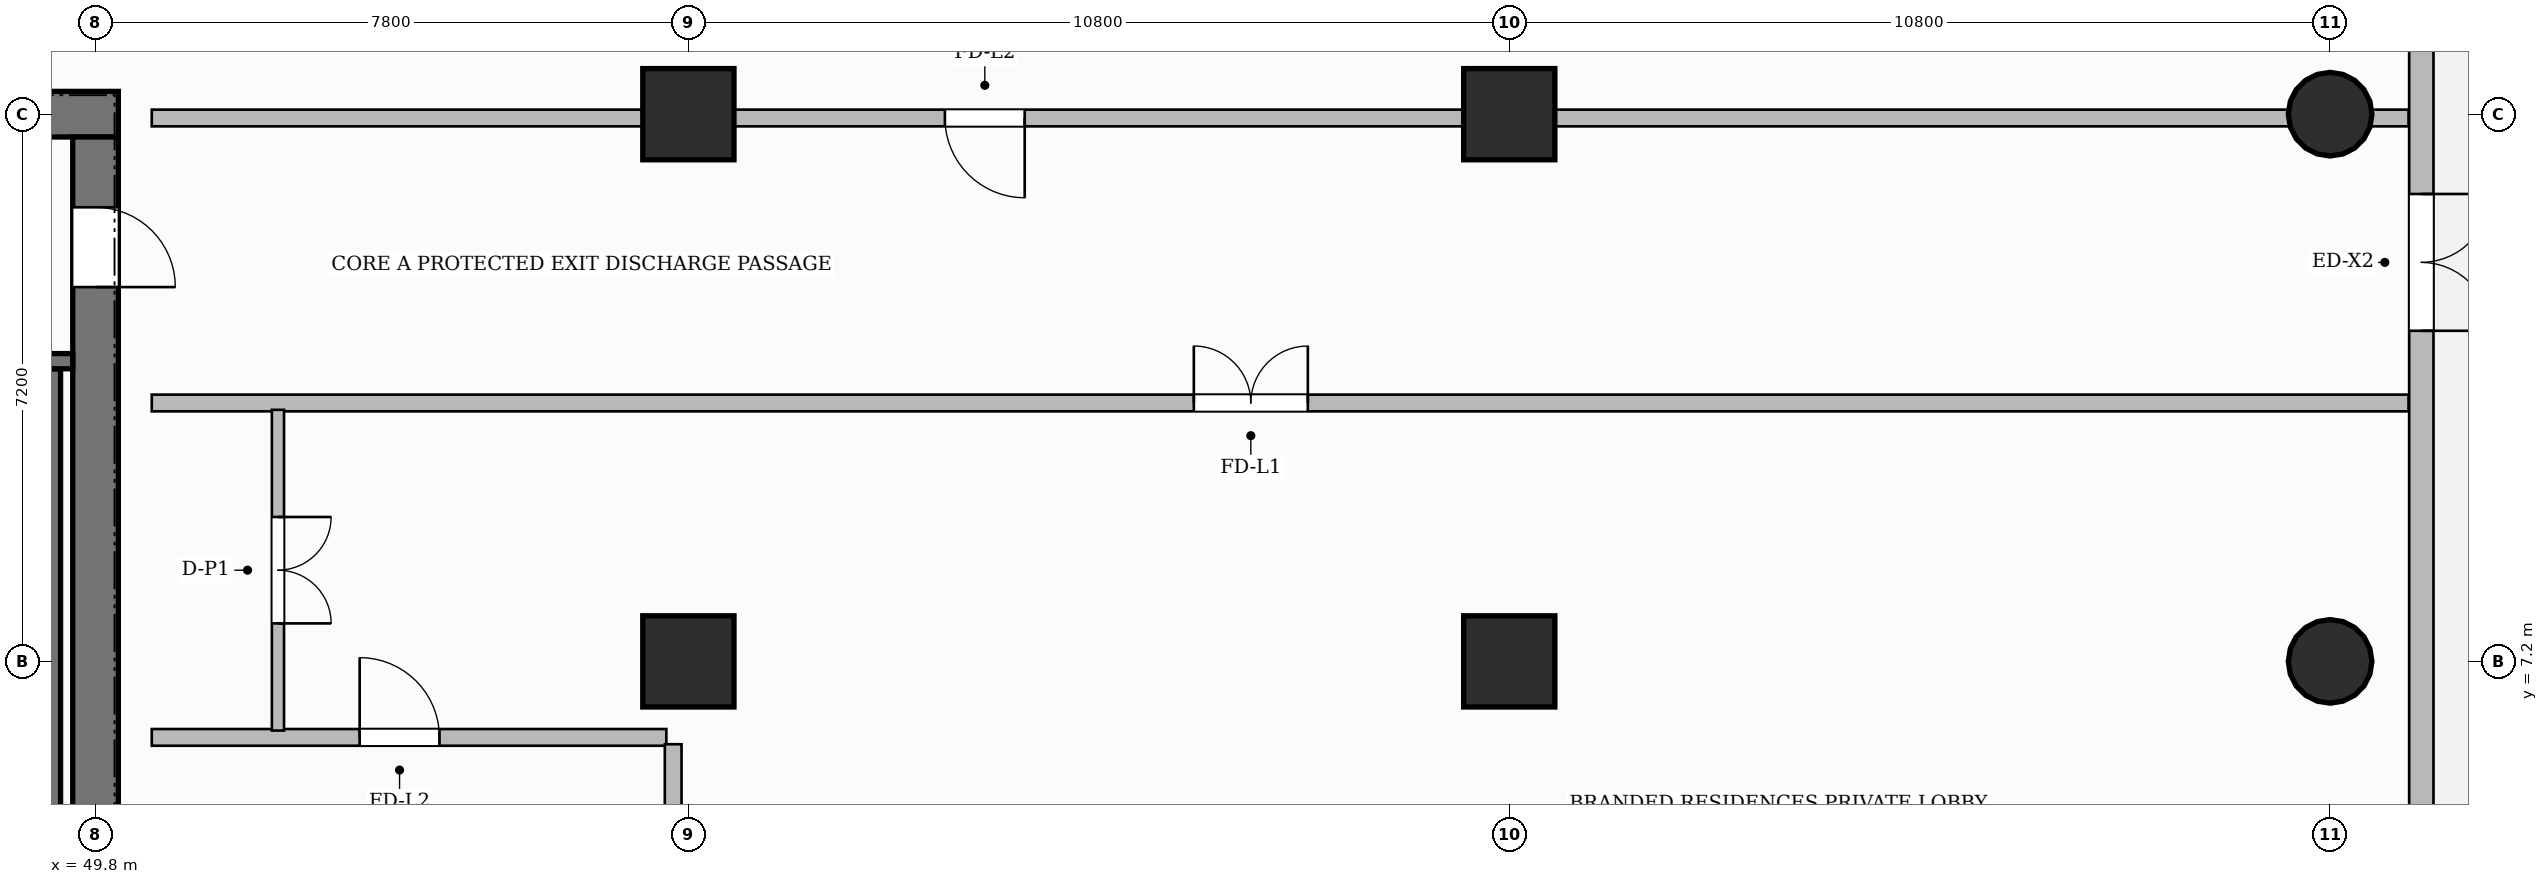
"""IFC4 building model, lengths in metres.
Left out: names, types, materials, properties, quantities, classifications, styles, units other than length and angle.
Written with IfcOpenShell. Run it as: python <this file> out.ifc"""

import sys

from ifc_helpers import new_model, si_unit, direction, frame, frame_2d, origin, origin_2d, place, context, subcontext, project, spatial, rectangle, circle, extrude, source, transform, mapped, element, fill, save


model = new_model("IFC4")
c1 = context("Model", 3, precision=1e-05, world=origin(), true_north=direction((0.0, 1.0)))
c2 = subcontext(c1, "Body", "Model", "MODEL_VIEW")
j1 = project(units=[si_unit("LENGTHUNIT", "METRE"), si_unit("PLANEANGLEUNIT", "RADIAN")], contexts=[c1])
p1 = place(None, origin())
s1 = spatial("IfcSite", under=j1, at=p1, CompositionType="ELEMENT")
p2 = place(p1, origin())
s2 = spatial("IfcBuilding", under=s1, at=p2, CompositionType="ELEMENT")
p3 = place(p2, origin())
s3 = spatial("IfcBuildingStorey", under=s2, at=p3, CompositionType="ELEMENT", Elevation=0.0)
p4 = place(p3, frame((34.5, 14.4, 0.0), z_axis=(0.0, 0.0, 1.0), x_axis=(1.0, 0.0, 0.0)))
e1 = element("IfcWall", 1, at=p4, inside=s3, PredefinedType="SHEAR", context=c2, shape_type="SweptSolid", body=[
    extrude(rectangle(XDim=15.6, YDim=0.6, at=frame_2d((7.8, 0.0))), origin(), (0.0, 0.0, 1.0), 5.4),
])
p5 = place(p4, frame((5.43, 0.0, 0.0)))
e2 = element("IfcOpeningElement", 2, at=p5, cuts=e1, PredefinedType="OPENING", context=c2, shape_type="SweptSolid", body=[
    extrude(rectangle(XDim=1.5, YDim=2.2, at=frame_2d((0.75, 1.1))), frame((0.0, 0.31, 0.0), z_axis=(0.0, -1.0, 0.0), x_axis=(1.0, 0.0, 0.0)), (0.0, 0.0, 1.0), 0.62),
])
p6 = place(p4, frame((1.645, 0.0, 0.0)))
e3 = element("IfcOpeningElement", 3, at=p6, cuts=e1, PredefinedType="OPENING", context=c2, shape_type="SweptSolid", body=[
    extrude(rectangle(XDim=1.05, YDim=2.15, at=frame_2d((0.525, 1.075))), frame((0.0, 0.31, 0.0), z_axis=(0.0, -1.0, 0.0), x_axis=(1.0, 0.0, 0.0)), (0.0, 0.0, 1.0), 0.62),
])
p7 = place(p4, frame((11.275, 0.0, 0.0)))
e4 = element("IfcOpeningElement", 4, at=p7, cuts=e1, PredefinedType="OPENING", context=c2, shape_type="SweptSolid", body=[
    extrude(rectangle(XDim=1.05, YDim=2.15, at=frame_2d((0.525, 1.075))), frame((0.0, 0.31, 0.0), z_axis=(0.0, -1.0, 0.0), x_axis=(1.0, 0.0, 0.0)), (0.0, 0.0, 1.0), 0.62),
])
p8 = place(p3, frame((49.8, 3.9, 0.0), z_axis=(0.0, 0.0, 1.0), x_axis=(0.0, 1.0, 0.0)))
e5 = element("IfcWall", 5, at=p8, inside=s3, PredefinedType="SHEAR", context=c2, shape_type="SweptSolid", body=[
    extrude(rectangle(XDim=10.2, YDim=0.6, at=frame_2d((5.1, 0.0))), origin(), (0.0, 0.0, 1.0), 5.4),
])
p9 = place(p8, frame((8.225, 0.0, 0.0)))
e6 = element("IfcOpeningElement", 6, at=p9, cuts=e5, PredefinedType="OPENING", context=c2, shape_type="SweptSolid", body=[
    extrude(rectangle(XDim=1.05, YDim=2.2, at=frame_2d((0.525, 1.1))), frame((0.0, 0.31, 0.0), z_axis=(0.0, -1.0, 0.0), x_axis=(1.0, 0.0, 0.0)), (0.0, 0.0, 1.0), 0.62),
])
m1 = source(origin(), c2, "Body", "SweptSolid", [
    extrude(rectangle(XDim=1.2, YDim=1.2, at=origin_2d()), origin(), (0.0, 0.0, 1.0), 5.4),
])
for number, where, z_axis, x_axis in (
    (7, (57.6, 7.2, 0.0), (0.0, 0.0, 1.0), (1.0, 0.0, 0.0)),
    (8, (57.6, 14.4, 0.0), (0.0, 0.0, 1.0), (1.0, 0.0, 0.0)),
    (9, (68.4, 7.2, 0.0), (0.0, 0.0, 1.0), (1.0, 0.0, 0.0)),
    (10, (68.4, 14.4, 0.0), (0.0, 0.0, 1.0), (1.0, 0.0, 0.0)),
):
    element("IfcColumn", number, at=place(p3, frame(where, z_axis=z_axis, x_axis=x_axis)), inside=s3, PredefinedType="COLUMN", context=c2, shape_type="MappedRepresentation", body=[
        mapped(m1, transform((0.0, 0.0, 0.0), scale=1.0)),
    ])
m2 = source(origin(), c2, "Body", "SweptSolid", [
    extrude(circle(Radius=0.55, at=origin_2d()), origin(), (0.0, 0.0, 1.0), 5.4),
])
for number, where, z_axis, x_axis in (
    (11, (79.2, 7.2, 0.0), (0.0, 0.0, 1.0), (1.0, 0.0, 0.0)),
    (12, (79.2, 14.4, 0.0), (0.0, 0.0, 1.0), (1.0, 0.0, 0.0)),
):
    element("IfcColumn", number, at=place(p3, frame(where, z_axis=z_axis, x_axis=x_axis)), inside=s3, PredefinedType="COLUMN", context=c2, shape_type="MappedRepresentation", body=[
        mapped(m2, transform((0.0, 0.0, 0.0), scale=1.0)),
    ])
p10 = place(p3, frame((49.24, 4.1, 0.0), z_axis=(0.0, 0.0, 1.0), x_axis=(0.0, 1.0, 0.0)))
e13 = element("IfcWall", 13, at=p10, inside=s3, PredefinedType="SHEAR", context=c2, shape_type="SweptSolid", body=[
    extrude(rectangle(XDim=6.95, YDim=0.2, at=frame_2d((3.475, 0.0))), origin(), (0.0, 0.0, 1.0), 5.4),
])
p11 = place(p3, frame((43.12, 11.15, 0.0), z_axis=(0.0, 0.0, 1.0), x_axis=(1.0, 0.0, 0.0)))
e14 = element("IfcWall", 14, at=p11, inside=s3, PredefinedType="SHEAR", context=c2, shape_type="SweptSolid", body=[
    extrude(rectangle(XDim=6.38, YDim=0.2, at=frame_2d((3.19, 0.0))), origin(), (0.0, 0.0, 1.0), 5.4),
])
p12 = place(p11, frame((1.045, 0.0, 0.0)))
e15 = element("IfcOpeningElement", 15, at=p12, cuts=e14, PredefinedType="OPENING", context=c2, shape_type="SweptSolid", body=[
    extrude(rectangle(XDim=1.05, YDim=2.2, at=frame_2d((0.525, 1.1))), frame((0.0, 0.11, 0.0), z_axis=(0.0, -1.0, 0.0), x_axis=(1.0, 0.0, 0.0)), (0.0, 0.0, 1.0), 0.22),
])
p13 = place(p11, frame((4.125, 0.0, 0.0)))
e16 = element("IfcOpeningElement", 16, at=p13, cuts=e14, PredefinedType="OPENING", context=c2, shape_type="SweptSolid", body=[
    extrude(rectangle(XDim=1.05, YDim=2.2, at=frame_2d((0.525, 1.1))), frame((0.0, 0.11, 0.0), z_axis=(0.0, -1.0, 0.0), x_axis=(1.0, 0.0, 0.0)), (0.0, 0.0, 1.0), 0.22),
])
p14 = place(p3, frame((50.54, 10.6, 0.0), z_axis=(0.0, 0.0, 1.0), x_axis=(1.0, 0.0, 0.0)))
e17 = element("IfcWall", 17, at=p14, inside=s3, PredefinedType="PARTITIONING", context=c2, shape_type="SweptSolid", body=[
    extrude(rectangle(XDim=29.692, YDim=0.22, at=frame_2d((14.846, 0.0))), origin(), (0.0, 0.0, 1.0), 5.1),
])
p15 = place(p14, frame((13.71, 0.0, 0.0)))
e18 = element("IfcOpeningElement", 18, at=p15, cuts=e17, PredefinedType="OPENING", context=c2, shape_type="SweptSolid", body=[
    extrude(rectangle(XDim=1.5, YDim=2.2, at=frame_2d((0.75, 1.1))), frame((0.0, 0.12, 0.0), z_axis=(0.0, -1.0, 0.0), x_axis=(1.0, 0.0, 0.0)), (0.0, 0.0, 1.0), 0.24),
])
p16 = place(p3, frame((50.54, 14.35, 0.0), z_axis=(0.0, 0.0, 1.0), x_axis=(1.0, 0.0, 0.0)))
e19 = element("IfcWall", 19, at=p16, inside=s3, PredefinedType="PARTITIONING", context=c2, shape_type="SweptSolid", body=[
    extrude(rectangle(XDim=29.692, YDim=0.22, at=frame_2d((14.846, 0.0))), origin(), (0.0, 0.0, 1.0), 4.085),
])
p17 = place(p16, frame((10.435, 0.0, 0.0)))
e20 = element("IfcOpeningElement", 20, at=p17, cuts=e19, PredefinedType="OPENING", context=c2, shape_type="SweptSolid", body=[
    extrude(rectangle(XDim=1.05, YDim=2.15, at=frame_2d((0.525, 1.075))), frame((0.0, 0.12, 0.0), z_axis=(0.0, -1.0, 0.0), x_axis=(1.0, 0.0, 0.0)), (0.0, 0.0, 1.0), 0.24),
])
p18 = place(p3, frame((50.54, 6.2, 0.0), z_axis=(0.0, 0.0, 1.0), x_axis=(1.0, 0.0, 0.0)))
e21 = element("IfcWall", 21, at=p18, inside=s3, PredefinedType="PARTITIONING", context=c2, shape_type="SweptSolid", body=[
    extrude(rectangle(XDim=6.77, YDim=0.22, at=frame_2d((3.385, 0.0))), origin(), (0.0, 0.0, 1.0), 5.1),
])
p19 = place(p18, frame((2.735, 0.0, 0.0)))
e22 = element("IfcOpeningElement", 22, at=p19, cuts=e21, PredefinedType="OPENING", context=c2, shape_type="SweptSolid", body=[
    extrude(rectangle(XDim=1.05, YDim=2.15, at=frame_2d((0.525, 1.075))), frame((0.0, 0.12, 0.0), z_axis=(0.0, -1.0, 0.0), x_axis=(1.0, 0.0, 0.0)), (0.0, 0.0, 1.0), 0.24),
])
p20 = place(p3, frame((57.4, 0.39, 0.0), z_axis=(0.0, 0.0, 1.0), x_axis=(0.0, 1.0, 0.0)))
e23 = element("IfcWall", 23, at=p20, inside=s3, PredefinedType="PARTITIONING", context=c2, shape_type="SweptSolid", body=[
    extrude(rectangle(XDim=5.72, YDim=0.22, at=frame_2d((2.86, 0.0))), origin(), (0.0, 0.0, 1.0), 4.085),
])
p21 = place(p3, frame((52.2, 10.51, 0.0), z_axis=(0.0, 0.0, 1.0), x_axis=(0.0, -1.0, 0.0)))
e24 = element("IfcWall", 24, at=p21, inside=s3, PredefinedType="PARTITIONING", context=c2, shape_type="SweptSolid", body=[
    extrude(rectangle(XDim=4.22, YDim=0.16, at=frame_2d((2.11, 0.0))), origin(), (0.0, 0.0, 1.0), 5.1),
])
p22 = place(p21, frame((1.41, 0.0, 0.0)))
e25 = element("IfcOpeningElement", 25, at=p22, cuts=e24, PredefinedType="OPENING", context=c2, shape_type="SweptSolid", body=[
    extrude(rectangle(XDim=1.4, YDim=2.35, at=frame_2d((0.7, 1.175))), frame((0.0, 0.09, 0.0), z_axis=(0.0, -1.0, 0.0), x_axis=(1.0, 0.0, 0.0)), (0.0, 0.0, 1.0), 0.18),
])
p23 = place(p3, frame((80.4, 0.05, 0.0), z_axis=(0.0, 0.0, 1.0), x_axis=(0.0, 1.0, 0.0)))
e26 = element("IfcWall", 26, at=p23, inside=s3, PredefinedType="SOLIDWALL", context=c2, shape_type="SweptSolid", body=[
    extrude(rectangle(XDim=46.7, YDim=0.32, at=frame_2d((23.35, 0.0))), origin(), (0.0, 0.0, 1.0), 5.1),
])
p24 = place(p23, frame((11.5, 0.0, 0.0)))
e27 = element("IfcOpeningElement", 27, at=p24, cuts=e26, PredefinedType="OPENING", context=c2, shape_type="SweptSolid", body=[
    extrude(rectangle(XDim=1.8, YDim=2.4, at=frame_2d((0.9, 1.2))), frame((0.0, 0.17, 0.0), z_axis=(0.0, -1.0, 0.0), x_axis=(1.0, 0.0, 0.0)), (0.0, 0.0, 1.0), 0.34),
])
p25 = place(p23, frame((16.75, 0.0, 0.0)))
e28 = element("IfcOpeningElement", 28, at=p25, cuts=e26, PredefinedType="OPENING", context=c2, shape_type="SweptSolid", body=[
    extrude(rectangle(XDim=2.4, YDim=2.8, at=frame_2d((1.2, 1.4))), frame((0.0, 0.17, 0.0), z_axis=(0.0, -1.0, 0.0), x_axis=(1.0, 0.0, 0.0)), (0.0, 0.0, 1.0), 0.34),
])
p26 = place(p23, frame((42.25, 0.0, 0.0)))
e29 = element("IfcOpeningElement", 29, at=p26, cuts=e26, PredefinedType="OPENING", context=c2, shape_type="SweptSolid", body=[
    extrude(rectangle(XDim=1.8, YDim=2.4, at=frame_2d((0.9, 1.2))), frame((0.0, 0.17, 0.0), z_axis=(0.0, -1.0, 0.0), x_axis=(1.0, 0.0, 0.0)), (0.0, 0.0, 1.0), 0.34),
])
m3 = source(origin(), c2, "Body", "SweptSolid", [
    extrude(rectangle(XDim=1.05, YDim=2.2, at=frame_2d((0.525, 1.1))), frame((0.0, 0.025, 0.0), z_axis=(0.0, -1.0, 0.0), x_axis=(1.0, 0.0, 0.0)), (0.0, 0.0, 1.0), 0.05),
])
p27 = place(p9, frame((1.05, 0.0, 0.0), z_axis=(0.0, 0.0, 1.0), x_axis=(-1.0, 0.0, 0.0)))
e30 = element("IfcDoor", 30, at=p27, inside=s3, OperationType="SINGLE_SWING_LEFT", PredefinedType="DOOR", context=c2, shape_type="MappedRepresentation", body=[
    mapped(m3, transform((0.0, 0.0, 0.0), scale=1.0)),
])
fill(e6, e30)
m4 = source(origin(), c2, "Body", "SweptSolid", [
    extrude(rectangle(XDim=1.5, YDim=2.2, at=frame_2d((0.75, 1.1))), frame((0.0, 0.025, 0.0), z_axis=(0.0, -1.0, 0.0), x_axis=(1.0, 0.0, 0.0)), (0.0, 0.0, 1.0), 0.05),
])
p28 = place(p15, origin())
e31 = element("IfcDoor", 31, at=p28, inside=s3, OperationType="DOUBLE_DOOR_SINGLE_SWING", PredefinedType="DOOR", context=c2, shape_type="MappedRepresentation", body=[
    mapped(m4, transform((0.0, 0.0, 0.0), scale=1.0)),
])
fill(e18, e31)
m5 = source(origin(), c2, "Body", "SweptSolid", [
    extrude(rectangle(XDim=1.05, YDim=2.15, at=frame_2d((0.525, 1.075))), frame((0.0, 0.025, 0.0), z_axis=(0.0, -1.0, 0.0), x_axis=(1.0, 0.0, 0.0)), (0.0, 0.0, 1.0), 0.05),
])
p29 = place(p17, frame((1.05, 0.0, 0.0), z_axis=(0.0, 0.0, 1.0), x_axis=(-1.0, 0.0, 0.0)))
e32 = element("IfcDoor", 32, at=p29, inside=s3, OperationType="SINGLE_SWING_RIGHT", PredefinedType="DOOR", context=c2, shape_type="MappedRepresentation", body=[
    mapped(m5, transform((0.0, 0.0, 0.0), scale=1.0)),
])
fill(e20, e32)
p30 = place(p19, origin())
e33 = element("IfcDoor", 33, at=p30, inside=s3, OperationType="SINGLE_SWING_LEFT", PredefinedType="DOOR", context=c2, shape_type="MappedRepresentation", body=[
    mapped(m5, transform((0.0, 0.0, 0.0), scale=1.0)),
])
fill(e22, e33)
m6 = source(origin(), c2, "Body", "SweptSolid", [
    extrude(rectangle(XDim=1.4, YDim=2.35, at=frame_2d((0.7, 1.175))), frame((0.0, 0.025, 0.0), z_axis=(0.0, -1.0, 0.0), x_axis=(1.0, 0.0, 0.0)), (0.0, 0.0, 1.0), 0.05),
])
p31 = place(p22, origin())
e34 = element("IfcDoor", 34, at=p31, inside=s3, OperationType="DOUBLE_DOOR_SINGLE_SWING", PredefinedType="DOOR", context=c2, shape_type="MappedRepresentation", body=[
    mapped(m6, transform((0.0, 0.0, 0.0), scale=1.0)),
])
fill(e25, e34)
m7 = source(origin(), c2, "Body", "SweptSolid", [
    extrude(rectangle(XDim=1.8, YDim=2.4, at=frame_2d((0.9, 1.2))), frame((0.0, 0.025, 0.0), z_axis=(0.0, -1.0, 0.0), x_axis=(1.0, 0.0, 0.0)), (0.0, 0.0, 1.0), 0.05),
])
p32 = place(p24, frame((1.8, 0.0, 0.0), z_axis=(0.0, 0.0, 1.0), x_axis=(-1.0, 0.0, 0.0)))
e35 = element("IfcDoor", 35, at=p32, inside=s3, OperationType="DOUBLE_DOOR_SINGLE_SWING", PredefinedType="DOOR", context=c2, shape_type="MappedRepresentation", body=[
    mapped(m7, transform((0.0, 0.0, 0.0), scale=1.0)),
])
fill(e27, e35)
save(model, sys.argv[1])
